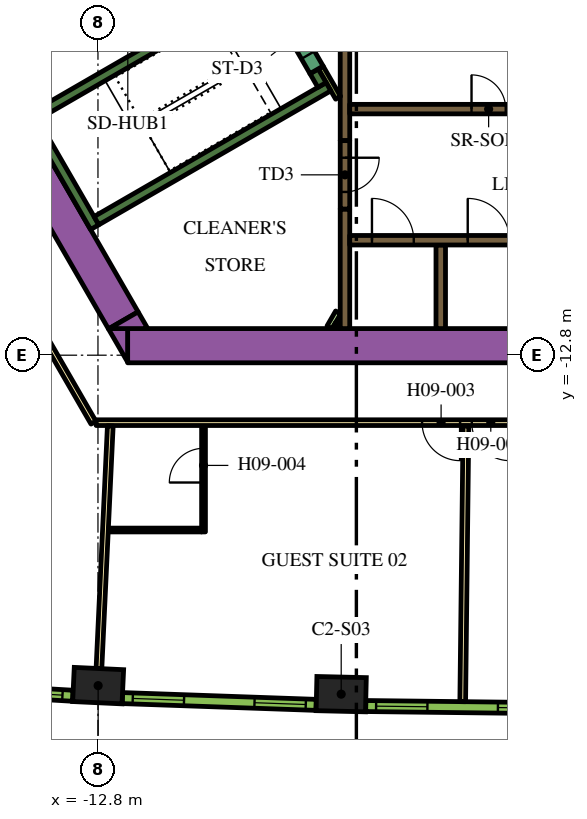
"""IFC4 building model, lengths in metres.
Left out: names, types, materials, properties, quantities, classifications, styles, units other than length and angle.
Written with IfcOpenShell. Run it as: python <this file> out.ifc"""

import sys

from ifc_helpers import new_model, si_unit, direction, frame, frame_2d, origin, origin_2d, place, context, subcontext, project, spatial, polyline, rectangle, outline, extrude, element, fill, save


model = new_model("IFC4")
c1 = context("Model", 3, precision=1e-05, world=origin(), true_north=direction((0.0, 1.0)))
c2 = subcontext(c1, "Body", "Model", "MODEL_VIEW")
j1 = project(units=[si_unit("LENGTHUNIT", "METRE"), si_unit("PLANEANGLEUNIT", "RADIAN")], contexts=[c1])
p1 = place(None, origin())
s1 = spatial("IfcSite", under=j1, at=p1, CompositionType="ELEMENT")
p2 = place(p1, origin())
s2 = spatial("IfcBuilding", under=s1, at=p2, CompositionType="ELEMENT")
p3 = place(p2, frame((0.0, 0.0, 126.6)))
s3 = spatial("IfcBuildingStorey", under=s2, at=p3, CompositionType="ELEMENT", Elevation=126.6)
for number, where, z_axis, x_axis in (
    (1, (-12.795, -21.494, 0.0), (0.0, 0.0, 1.0), (0.999, -0.047, 0.0)),
    (2, (-6.399, -21.719, 0.0), (0.0, 0.0, 1.0), (1.0, -0.023, 0.0)),
):
    element("IfcColumn", number, at=place(p3, frame(where, z_axis=z_axis, x_axis=x_axis)), inside=s3, PredefinedType="COLUMN", context=c2, shape_type="SweptSolid", body=[
        extrude(rectangle(XDim=1.3, YDim=0.9, at=origin_2d()), origin(), (0.0, 0.0, 1.0), 3.9),
    ])
p4 = place(p3, frame((-12.019, -12.55, 0.0), z_axis=(0.0, 0.0, 1.0), x_axis=(1.0, 0.0, 0.0)))
e3 = element("IfcWall", 3, at=p4, inside=s3, PredefinedType="SOLIDWALL", context=c2, shape_type="SweptSolid", body=[
    extrude(rectangle(XDim=21.63, YDim=0.9, at=frame_2d((10.815, 0.0))), origin(), (0.0, 0.0, 1.0), 3.9),
])
p5 = place(p3, origin())
e4 = element("IfcWall", 4, at=p5, inside=s3, PredefinedType="SOLIDWALL", context=c2, shape_type="SweptSolid", body=[
    extrude(outline(polyline([(-12.529, -12.1), (-12.021, -12.1), (-12.021, -12.98), (-12.529, -12.1)])), origin(), (0.0, 0.0, 1.0), 3.9),
])
p6 = place(p3, frame((-12.134, -11.883, 0.0), z_axis=(0.0, 0.0, 1.0), x_axis=(-0.500005339912, 0.866022320763, 0.0)))
e5 = element("IfcWall", 5, at=p6, inside=s3, PredefinedType="SOLIDWALL", context=c2, shape_type="SweptSolid", body=[
    extrude(rectangle(XDim=9.488, YDim=0.9, at=frame_2d((4.744, 0.0))), origin(), (0.0, 0.0, 1.0), 3.9),
])
e6 = element("IfcWall", 6, at=p5, inside=s3, PredefinedType="SOLIDWALL", context=c2, shape_type="SweptSolid", body=[
    extrude(outline(polyline([(-11.489, -12.1), (-12.505, -12.1), (-11.743, -11.66), (-11.489, -12.1)])), origin(), (0.0, 0.0, 1.0), 3.9),
])
p7 = place(p3, frame((-12.885, -9.431, 0.0), z_axis=(0.0, 0.0, 1.0), x_axis=(-0.500020560727, 0.866013532718, 0.0)))
e7 = element("IfcWall", 7, at=p7, inside=s3, PredefinedType="SOLIDWALL", context=c2, shape_type="SweptSolid", body=[
    extrude(rectangle(XDim=3.45, YDim=0.25, at=frame_2d((1.725, 0.0))), origin(), (0.0, 0.0, 1.0), 3.9),
])
p8 = place(p3, frame((-14.44, -6.49, 0.0), z_axis=(0.0, 0.0, 1.0), x_axis=(0.866022966069, 0.500004222222, 0.0)))
e8 = element("IfcWall", 8, at=p8, inside=s3, PredefinedType="SOLIDWALL", context=c2, shape_type="SweptSolid", body=[
    extrude(rectangle(XDim=6.8, YDim=0.25, at=frame_2d((3.4, 0.0))), origin(), (0.0, 0.0, 1.0), 3.9),
])
p9 = place(p3, frame((-12.84, -9.261, 0.0), z_axis=(0.0, 0.0, 1.0), x_axis=(0.866016039709, 0.500016218704, 0.0)))
e9 = element("IfcWall", 9, at=p9, inside=s3, PredefinedType="SOLIDWALL", context=c2, shape_type="SweptSolid", body=[
    extrude(rectangle(XDim=7.05, YDim=0.25, at=frame_2d((3.525, 0.0))), origin(), (0.0, 0.0, 1.0), 3.9),
])
p10 = place(p3, frame((-6.905, -5.69, 0.0), z_axis=(0.0, 0.0, 1.0), x_axis=(-0.499993700073, 0.866029041019, 0.0)))
e10 = element("IfcWall", 10, at=p10, inside=s3, PredefinedType="SOLIDWALL", context=c2, shape_type="SweptSolid", body=[
    extrude(rectangle(XDim=0.416, YDim=0.25, at=frame_2d((0.208, 0.0))), origin(), (0.0, 0.0, 1.0), 3.9),
])
p11 = place(p3, frame((-3.78, -12.1, 0.0), z_axis=(0.0, 0.0, 1.0), x_axis=(0.0, 1.0, 0.0)))
e11 = element("IfcWall", 11, at=p11, inside=s3, PredefinedType="SOLIDWALL", context=c2, shape_type="SweptSolid", body=[
    extrude(rectangle(XDim=2.2, YDim=0.25, at=frame_2d((1.1, 0.0))), origin(), (0.0, 0.0, 1.0), 3.9),
])
p12 = place(p3, frame((-6.3, -12.1, 0.0), z_axis=(0.0, 0.0, 1.0), x_axis=(0.0, 1.0, 0.0)))
e12 = element("IfcWall", 12, at=p12, inside=s3, PredefinedType="SOLIDWALL", context=c2, shape_type="SweptSolid", body=[
    extrude(rectangle(XDim=3.146, YDim=0.25, at=frame_2d((1.573, 0.0))), origin(), (0.0, 0.0, 1.0), 3.9),
])
p13 = place(p3, frame((-6.3, -4.24, 0.0), z_axis=(0.0, 0.0, 1.0), x_axis=(0.0, -1.0, 0.0)))
e13 = element("IfcWall", 13, at=p13, inside=s3, PredefinedType="SOLIDWALL", context=c2, shape_type="SweptSolid", body=[
    extrude(rectangle(XDim=2.914, YDim=0.25, at=frame_2d((1.457, 0.0))), origin(), (0.0, 0.0, 1.0), 3.9),
])
p14 = place(p3, frame((-6.708, -12.068, 0.0), z_axis=(0.0, 0.0, 1.0), x_axis=(0.500000789788, 0.8660249478, 0.0)))
e14 = element("IfcWall", 14, at=p14, inside=s3, PredefinedType="PARTITIONING", context=c2, shape_type="SweptSolid", body=[
    extrude(rectangle(XDim=0.456, YDim=0.15, at=frame_2d((0.228, 0.0))), origin(), (0.0, 0.0, 1.0), 2.75),
])
p15 = place(p3, frame((-6.534, -12.068, 0.0), z_axis=(0.0, 0.0, 1.0), x_axis=(0.500240224089, 0.865886665912, 0.0)))
e15 = element("IfcWall", 15, at=p15, inside=s3, PredefinedType="PARTITIONING", context=c2, shape_type="SweptSolid", body=[
    extrude(rectangle(XDim=0.109, YDim=0.15, at=frame_2d((0.054, 0.0))), origin(), (0.0, 0.0, 1.0), 2.75),
])
p16 = place(p3, frame((-6.48, -6.027, 0.0), z_axis=(0.0, 0.0, 1.0), x_axis=(-0.499936960004, 0.866061796884, 0.0)))
e16 = element("IfcWall", 16, at=p16, inside=s3, PredefinedType="PARTITIONING", context=c2, shape_type="SweptSolid", body=[
    extrude(rectangle(XDim=0.919, YDim=0.15, at=frame_2d((0.46, 0.0))), origin(), (0.0, 0.0, 1.0), 3.9),
])
p17 = place(p3, frame((-6.175, -9.775, 0.0), z_axis=(0.0, 0.0, 1.0), x_axis=(1.0, 0.0, 0.0)))
e17 = element("IfcWall", 17, at=p17, inside=s3, PredefinedType="SOLIDWALL", context=c2, shape_type="SweptSolid", body=[
    extrude(rectangle(XDim=12.35, YDim=0.25, at=frame_2d((6.175, 0.0))), origin(), (0.0, 0.0, 1.0), 3.9),
])
p18 = place(p17, frame((0.585, 0.0, 0.0)))
e18 = element("IfcOpeningElement", 18, at=p18, cuts=e17, PredefinedType="OPENING", context=c2, shape_type="SweptSolid", body=[
    extrude(rectangle(XDim=1.1, YDim=2.1, at=frame_2d((0.55, 1.05))), frame((0.0, 0.135, 0.0), z_axis=(0.0, -1.0, 0.0), x_axis=(1.0, 0.0, 0.0)), (0.0, 0.0, 1.0), 0.27),
])
p19 = place(p17, frame((3.105, 0.0, 0.0)))
e19 = element("IfcOpeningElement", 19, at=p19, cuts=e17, PredefinedType="OPENING", context=c2, shape_type="SweptSolid", body=[
    extrude(rectangle(XDim=1.1, YDim=2.1, at=frame_2d((0.55, 1.05))), frame((0.0, 0.135, 0.0), z_axis=(0.0, -1.0, 0.0), x_axis=(1.0, 0.0, 0.0)), (0.0, 0.0, 1.0), 0.27),
])
p20 = place(p17, frame((5.625, 0.0, 0.0)))
e20 = element("IfcOpeningElement", 20, at=p20, cuts=e17, PredefinedType="OPENING", context=c2, shape_type="SweptSolid", body=[
    extrude(rectangle(XDim=1.1, YDim=2.1, at=frame_2d((0.55, 1.05))), frame((0.0, 0.135, 0.0), z_axis=(0.0, -1.0, 0.0), x_axis=(1.0, 0.0, 0.0)), (0.0, 0.0, 1.0), 0.27),
])
p21 = place(p17, frame((8.145, 0.0, 0.0)))
e21 = element("IfcOpeningElement", 21, at=p21, cuts=e17, PredefinedType="OPENING", context=c2, shape_type="SweptSolid", body=[
    extrude(rectangle(XDim=1.1, YDim=2.1, at=frame_2d((0.55, 1.05))), frame((0.0, 0.135, 0.0), z_axis=(0.0, -1.0, 0.0), x_axis=(1.0, 0.0, 0.0)), (0.0, 0.0, 1.0), 0.27),
])
p22 = place(p17, frame((10.665, 0.0, 0.0)))
e22 = element("IfcOpeningElement", 22, at=p22, cuts=e17, PredefinedType="OPENING", context=c2, shape_type="SweptSolid", body=[
    extrude(rectangle(XDim=1.1, YDim=2.1, at=frame_2d((0.55, 1.05))), frame((0.0, 0.135, 0.0), z_axis=(0.0, -1.0, 0.0), x_axis=(1.0, 0.0, 0.0)), (0.0, 0.0, 1.0), 0.27),
])
p23 = place(p3, frame((-6.175, -6.325, 0.0), z_axis=(0.0, 0.0, 1.0), x_axis=(1.0, 0.0, 0.0)))
e23 = element("IfcWall", 23, at=p23, inside=s3, PredefinedType="SOLIDWALL", context=c2, shape_type="SweptSolid", body=[
    extrude(rectangle(XDim=12.35, YDim=0.25, at=frame_2d((6.175, 0.0))), origin(), (0.0, 0.0, 1.0), 3.9),
])
p24 = place(p23, frame((3.205, 0.0, 0.0)))
e24 = element("IfcOpeningElement", 24, at=p24, cuts=e23, PredefinedType="OPENING", context=c2, shape_type="SweptSolid", body=[
    extrude(rectangle(XDim=0.9, YDim=2.1, at=frame_2d((0.45, 1.05))), frame((0.0, 0.135, 0.0), z_axis=(0.0, -1.0, 0.0), x_axis=(1.0, 0.0, 0.0)), (0.0, 0.0, 1.0), 0.27),
])
p25 = place(p23, frame((8.145, 0.0, 0.0)))
e25 = element("IfcOpeningElement", 25, at=p25, cuts=e23, PredefinedType="OPENING", context=c2, shape_type="SweptSolid", body=[
    extrude(rectangle(XDim=1.1, YDim=2.1, at=frame_2d((0.55, 1.05))), frame((0.0, 0.135, 0.0), z_axis=(0.0, -1.0, 0.0), x_axis=(1.0, 0.0, 0.0)), (0.0, 0.0, 1.0), 0.27),
])
p26 = place(p23, frame((10.665, 0.0, 0.0)))
e26 = element("IfcOpeningElement", 26, at=p26, cuts=e23, PredefinedType="OPENING", context=c2, shape_type="SweptSolid", body=[
    extrude(rectangle(XDim=1.1, YDim=2.1, at=frame_2d((0.55, 1.05))), frame((0.0, 0.135, 0.0), z_axis=(0.0, -1.0, 0.0), x_axis=(1.0, 0.0, 0.0)), (0.0, 0.0, 1.0), 0.27),
])
p27 = place(p3, frame((-8.098, -3.474, 0.0), z_axis=(0.0, 0.0, 1.0), x_axis=(0.49994051562, -0.866059744384, 0.0)))
e27 = element("IfcWall", 27, at=p27, inside=s3, PredefinedType="SOLIDWALL", context=c2, shape_type="SweptSolid", body=[
    extrude(rectangle(XDim=2.1, YDim=0.4, at=frame_2d((1.05, 0.0))), origin(), (0.0, 0.0, 1.0), 3.9),
])
p28 = place(p27, frame((0.45, 0.0, 0.0)))
e28 = element("IfcOpeningElement", 28, at=p28, cuts=e27, PredefinedType="OPENING", context=c2, shape_type="SweptSolid", body=[
    extrude(rectangle(XDim=1.2, YDim=2.1, at=frame_2d((0.6, 1.05))), frame((0.0, 0.21, 0.0), z_axis=(0.0, -1.0, 0.0), x_axis=(1.0, 0.0, 0.0)), (0.0, 0.0, 1.0), 0.42),
])
p29 = place(p3, frame((-6.3, -7.154, 0.0), z_axis=(0.0, 0.0, 1.0), x_axis=(0.0, -1.0, 0.0)))
e29 = element("IfcWall", 29, at=p29, inside=s3, PredefinedType="SOLIDWALL", context=c2, shape_type="SweptSolid", body=[
    extrude(rectangle(XDim=1.8, YDim=0.25, at=frame_2d((0.9, 0.0))), origin(), (0.0, 0.0, 1.0), 3.9),
])
p30 = place(p29, frame((0.45, 0.0, 0.0)))
e30 = element("IfcOpeningElement", 30, at=p30, cuts=e29, PredefinedType="OPENING", context=c2, shape_type="SweptSolid", body=[
    extrude(rectangle(XDim=0.9, YDim=2.1, at=frame_2d((0.45, 1.05))), frame((0.0, 0.135, 0.0), z_axis=(0.0, -1.0, 0.0), x_axis=(1.0, 0.0, 0.0)), (0.0, 0.0, 1.0), 0.27),
])
p31 = place(p3, frame((-12.918, -14.575, 0.0), z_axis=(0.0, 0.0, 1.0), x_axis=(-0.500009150678, 0.866020120573, 0.0)))
e31 = element("IfcWall", 31, at=p31, inside=s3, PredefinedType="PARTITIONING", context=c2, shape_type="SweptSolid", body=[
    extrude(rectangle(XDim=5.258, YDim=0.15, at=frame_2d((2.629, 0.0))), origin(), (0.0, 0.0, 1.0), 2.75),
])
p32 = place(p3, frame((12.918, -14.575, 0.0), z_axis=(0.0, 0.0, 1.0), x_axis=(-1.0, 0.0, 0.0)))
e32 = element("IfcWall", 32, at=p32, inside=s3, PredefinedType="PARTITIONING", context=c2, shape_type="SweptSolid", body=[
    extrude(rectangle(XDim=25.766, YDim=0.15, at=frame_2d((12.883, 0.0))), origin(), (0.0, 0.0, 1.0), 2.75),
])
p33 = place(p32, frame((16.189, 0.0, 0.0)))
e33 = element("IfcOpeningElement", 33, at=p33, cuts=e32, PredefinedType="OPENING", context=c2, shape_type="SweptSolid", body=[
    extrude(rectangle(XDim=1.0, YDim=2.1, at=frame_2d((0.5, 1.05))), frame((0.0, 0.085, 0.0), z_axis=(0.0, -1.0, 0.0), x_axis=(1.0, 0.0, 0.0)), (0.0, 0.0, 1.0), 0.17),
])
p34 = place(p32, frame((14.882, 0.0, 0.0)))
e34 = element("IfcOpeningElement", 34, at=p34, cuts=e32, PredefinedType="OPENING", context=c2, shape_type="SweptSolid", body=[
    extrude(rectangle(XDim=1.0, YDim=2.1, at=frame_2d((0.5, 1.05))), frame((0.0, 0.085, 0.0), z_axis=(0.0, -1.0, 0.0), x_axis=(1.0, 0.0, 0.0)), (0.0, 0.0, 1.0), 0.17),
])
p35 = place(p32, frame((0.596, 0.0, 0.0)))
e35 = element("IfcOpeningElement", 35, at=p35, cuts=e32, PredefinedType="OPENING", context=c2, shape_type="SweptSolid", body=[
    extrude(rectangle(XDim=1.1, YDim=2.1, at=frame_2d((0.55, 1.05))), frame((0.0, 0.085, 0.0), z_axis=(0.0, -1.0, 0.0), x_axis=(1.0, 0.0, 0.0)), (0.0, 0.0, 1.0), 0.17),
])
p36 = place(p3, frame((-12.774, -21.045, 0.0), z_axis=(0.0, 0.0, 1.0), x_axis=(0.046750341626, 0.998906605023, 0.0)))
e36 = element("IfcWall", 36, at=p36, inside=s3, PredefinedType="PARTITIONING", context=c2, shape_type="SweptSolid", body=[
    extrude(rectangle(XDim=6.392, YDim=0.15, at=frame_2d((3.196, 0.0))), origin(), (0.0, 0.0, 1.0), 2.75),
])
p37 = place(p3, frame((-3.202, -21.916, 0.0), z_axis=(0.0, 0.0, 1.0), x_axis=(0.011707696285, 0.999931462575, 0.0)))
e37 = element("IfcWall", 37, at=p37, inside=s3, PredefinedType="PARTITIONING", context=c2, shape_type="SweptSolid", body=[
    extrude(rectangle(XDim=7.257, YDim=0.15, at=frame_2d((3.628, 0.0))), origin(), (0.0, 0.0, 1.0), 2.75),
])
p38 = place(p3, frame((-10.022, -17.45, 0.0), z_axis=(0.0, 0.0, 1.0), x_axis=(0.0, 1.0, 0.0)))
e38 = element("IfcWall", 38, at=p38, inside=s3, PredefinedType="PARTITIONING", context=c2, shape_type="SweptSolid", body=[
    extrude(rectangle(XDim=2.8, YDim=0.1, at=frame_2d((1.4, 0.0))), origin(), (0.0, 0.0, 1.0), 2.75),
])
p39 = place(p38, frame((1.3, 0.0, 0.0)))
e39 = element("IfcOpeningElement", 39, at=p39, cuts=e38, PredefinedType="OPENING", context=c2, shape_type="SweptSolid", body=[
    extrude(rectangle(XDim=0.9, YDim=2.1, at=frame_2d((0.45, 1.05))), frame((0.0, 0.06, 0.0), z_axis=(0.0, -1.0, 0.0), x_axis=(1.0, 0.0, 0.0)), (0.0, 0.0, 1.0), 0.12),
])
p40 = place(p3, frame((-10.072, -17.4, 0.0), z_axis=(0.0, 0.0, 1.0), x_axis=(-1.0, 0.0, 0.0)))
e40 = element("IfcWall", 40, at=p40, inside=s3, PredefinedType="PARTITIONING", context=c2, shape_type="SweptSolid", body=[
    extrude(rectangle(XDim=2.45, YDim=0.1, at=frame_2d((1.225, 0.0))), origin(), (0.0, 0.0, 1.0), 2.75),
])
p41 = place(p3, frame((-18.553, -21.463, 0.0), z_axis=(0.0, 0.0, 1.0), x_axis=(0.998290511436, -0.058447025388, 0.0)))
e41 = element("IfcWall", 41, at=p41, inside=s3, PredefinedType="SOLIDWALL", context=c2, shape_type="SweptSolid", body=[
    extrude(rectangle(XDim=5.1, YDim=0.29, at=frame_2d((2.55, 0.0))), origin(), (0.0, 0.0, 1.0), 3.65),
])
p42 = place(p41, frame((0.273, 0.0, 0.9)))
e42 = element("IfcOpeningElement", 42, at=p42, cuts=e41, PredefinedType="OPENING", context=c2, shape_type="SweptSolid", body=[
    extrude(rectangle(XDim=1.35, YDim=2.15, at=frame_2d((0.675, 1.075))), frame((0.0, 0.155, 0.0), z_axis=(0.0, -1.0, 0.0), x_axis=(1.0, 0.0, 0.0)), (0.0, 0.0, 1.0), 0.31),
])
p43 = place(p41, frame((3.478, 0.0, 0.9)))
e43 = element("IfcOpeningElement", 43, at=p43, cuts=e41, PredefinedType="OPENING", context=c2, shape_type="SweptSolid", body=[
    extrude(rectangle(XDim=1.35, YDim=2.15, at=frame_2d((0.675, 1.075))), frame((0.0, 0.155, 0.0), z_axis=(0.0, -1.0, 0.0), x_axis=(1.0, 0.0, 0.0)), (0.0, 0.0, 1.0), 0.31),
])
p44 = place(p3, frame((-12.157, -21.822, 0.0), z_axis=(0.0, 0.0, 1.0), x_axis=(0.999385993957, -0.035037623812, 0.0)))
e44 = element("IfcWall", 44, at=p44, inside=s3, PredefinedType="SOLIDWALL", context=c2, shape_type="SweptSolid", body=[
    extrude(rectangle(XDim=5.101, YDim=0.29, at=frame_2d((2.55, 0.0))), origin(), (0.0, 0.0, 1.0), 3.65),
])
p45 = place(p44, frame((0.273, 0.0, 0.9)))
e45 = element("IfcOpeningElement", 45, at=p45, cuts=e44, PredefinedType="OPENING", context=c2, shape_type="SweptSolid", body=[
    extrude(rectangle(XDim=1.35, YDim=2.15, at=frame_2d((0.675, 1.075))), frame((0.0, 0.155, 0.0), z_axis=(0.0, -1.0, 0.0), x_axis=(1.0, 0.0, 0.0)), (0.0, 0.0, 1.0), 0.31),
])
p46 = place(p44, frame((3.478, 0.0, 0.9)))
e46 = element("IfcOpeningElement", 46, at=p46, cuts=e44, PredefinedType="OPENING", context=c2, shape_type="SweptSolid", body=[
    extrude(rectangle(XDim=1.35, YDim=2.15, at=frame_2d((0.675, 1.075))), frame((0.0, 0.155, 0.0), z_axis=(0.0, -1.0, 0.0), x_axis=(1.0, 0.0, 0.0)), (0.0, 0.0, 1.0), 0.31),
])
p47 = place(p3, frame((-5.753, -22.031, 0.0), z_axis=(0.0, 0.0, 1.0), x_axis=(0.999931786565, -0.011679992145, 0.0)))
e47 = element("IfcWall", 47, at=p47, inside=s3, PredefinedType="SOLIDWALL", context=c2, shape_type="SweptSolid", body=[
    extrude(rectangle(XDim=5.1, YDim=0.29, at=frame_2d((2.55, 0.0))), origin(), (0.0, 0.0, 1.0), 3.65),
])
p48 = place(p47, frame((0.272, 0.0, 0.9)))
e48 = element("IfcOpeningElement", 48, at=p48, cuts=e47, PredefinedType="OPENING", context=c2, shape_type="SweptSolid", body=[
    extrude(rectangle(XDim=1.35, YDim=2.15, at=frame_2d((0.675, 1.075))), frame((0.0, 0.155, 0.0), z_axis=(0.0, -1.0, 0.0), x_axis=(1.0, 0.0, 0.0)), (0.0, 0.0, 1.0), 0.31),
])
p49 = place(p47, frame((3.478, 0.0, 0.9)))
e49 = element("IfcOpeningElement", 49, at=p49, cuts=e47, PredefinedType="OPENING", context=c2, shape_type="SweptSolid", body=[
    extrude(rectangle(XDim=1.35, YDim=2.15, at=frame_2d((0.675, 1.075))), frame((0.0, 0.155, 0.0), z_axis=(0.0, -1.0, 0.0), x_axis=(1.0, 0.0, 0.0)), (0.0, 0.0, 1.0), 0.31),
])
p50 = place(p18, origin())
e50 = element("IfcDoor", 50, at=p50, inside=s3, OperationType="DOUBLE_DOOR_SLIDING", PredefinedType="DOOR", context=c2, shape_type="SweptSolid", body=[
    extrude(rectangle(XDim=1.1, YDim=2.1, at=frame_2d((0.55, 1.05))), frame((0.0, 0.025, 0.0), z_axis=(0.0, -1.0, 0.0), x_axis=(1.0, 0.0, 0.0)), (0.0, 0.0, 1.0), 0.05),
])
fill(e18, e50)
p51 = place(p19, origin())
e51 = element("IfcDoor", 51, at=p51, inside=s3, OperationType="DOUBLE_DOOR_SLIDING", PredefinedType="DOOR", context=c2, shape_type="SweptSolid", body=[
    extrude(rectangle(XDim=1.1, YDim=2.1, at=frame_2d((0.55, 1.05))), frame((0.0, 0.025, 0.0), z_axis=(0.0, -1.0, 0.0), x_axis=(1.0, 0.0, 0.0)), (0.0, 0.0, 1.0), 0.05),
])
fill(e19, e51)
p52 = place(p24, origin())
e52 = element("IfcDoor", 52, at=p52, inside=s3, OperationType="SINGLE_SWING_LEFT", PredefinedType="DOOR", context=c2, shape_type="SweptSolid", body=[
    extrude(rectangle(XDim=0.9, YDim=2.1, at=frame_2d((0.45, 1.05))), frame((0.0, 0.025, 0.0), z_axis=(0.0, -1.0, 0.0), x_axis=(1.0, 0.0, 0.0)), (0.0, 0.0, 1.0), 0.05),
])
fill(e24, e52)
p53 = place(p28, origin())
e53 = element("IfcDoor", 53, at=p53, inside=s3, OperationType="SINGLE_SWING_LEFT", PredefinedType="DOOR", context=c2, shape_type="SweptSolid", body=[
    extrude(rectangle(XDim=1.2, YDim=2.1, at=frame_2d((0.6, 1.05))), frame((0.0, 0.025, 0.0), z_axis=(0.0, -1.0, 0.0), x_axis=(1.0, 0.0, 0.0)), (0.0, 0.0, 1.0), 0.05),
])
fill(e28, e53)
p54 = place(p30, origin())
e54 = element("IfcDoor", 54, at=p54, inside=s3, OperationType="SINGLE_SWING_LEFT", PredefinedType="DOOR", context=c2, shape_type="SweptSolid", body=[
    extrude(rectangle(XDim=0.9, YDim=2.1, at=frame_2d((0.45, 1.05))), frame((0.0, 0.025, 0.0), z_axis=(0.0, -1.0, 0.0), x_axis=(1.0, 0.0, 0.0)), (0.0, 0.0, 1.0), 0.05),
])
fill(e30, e54)
p55 = place(p33, origin())
e55 = element("IfcDoor", 55, at=p55, inside=s3, OperationType="SINGLE_SWING_LEFT", PredefinedType="DOOR", context=c2, shape_type="SweptSolid", body=[
    extrude(rectangle(XDim=1.0, YDim=2.1, at=frame_2d((0.5, 1.05))), frame((0.0, 0.025, 0.0), z_axis=(0.0, -1.0, 0.0), x_axis=(1.0, 0.0, 0.0)), (0.0, 0.0, 1.0), 0.05),
])
fill(e33, e55)
p56 = place(p39, origin())
e56 = element("IfcDoor", 56, at=p56, inside=s3, OperationType="SINGLE_SWING_LEFT", PredefinedType="DOOR", context=c2, shape_type="SweptSolid", body=[
    extrude(rectangle(XDim=0.9, YDim=2.1, at=frame_2d((0.45, 1.05))), frame((0.0, 0.025, 0.0), z_axis=(0.0, -1.0, 0.0), x_axis=(1.0, 0.0, 0.0)), (0.0, 0.0, 1.0), 0.05),
])
fill(e39, e56)
p57 = place(p34, origin())
e57 = element("IfcDoor", 57, at=p57, inside=s3, OperationType="SINGLE_SWING_RIGHT", PredefinedType="DOOR", context=c2, shape_type="SweptSolid", body=[
    extrude(rectangle(XDim=1.0, YDim=2.1, at=frame_2d((0.5, 1.05))), frame((0.0, 0.025, 0.0), z_axis=(0.0, -1.0, 0.0), x_axis=(1.0, 0.0, 0.0)), (0.0, 0.0, 1.0), 0.05),
])
fill(e34, e57)
p58 = place(p43, origin())
e58 = element("IfcWindow", 58, at=p58, inside=s3, PartitioningType="DOUBLE_PANEL_VERTICAL", PredefinedType="WINDOW", context=c2, shape_type="SweptSolid", body=[
    extrude(rectangle(XDim=1.35, YDim=2.15, at=frame_2d((0.675, 1.075))), frame((0.0, 0.015, 0.0), z_axis=(0.0, -1.0, 0.0), x_axis=(1.0, 0.0, 0.0)), (0.0, 0.0, 1.0), 0.06),
])
fill(e43, e58)
p59 = place(p45, origin())
e59 = element("IfcWindow", 59, at=p59, inside=s3, PartitioningType="DOUBLE_PANEL_VERTICAL", PredefinedType="WINDOW", context=c2, shape_type="SweptSolid", body=[
    extrude(rectangle(XDim=1.35, YDim=2.15, at=frame_2d((0.675, 1.075))), frame((0.0, 0.015, 0.0), z_axis=(0.0, -1.0, 0.0), x_axis=(1.0, 0.0, 0.0)), (0.0, 0.0, 1.0), 0.06),
])
fill(e45, e59)
p60 = place(p46, origin())
e60 = element("IfcWindow", 60, at=p60, inside=s3, PartitioningType="DOUBLE_PANEL_VERTICAL", PredefinedType="WINDOW", context=c2, shape_type="SweptSolid", body=[
    extrude(rectangle(XDim=1.35, YDim=2.15, at=frame_2d((0.675, 1.075))), frame((0.0, 0.015, 0.0), z_axis=(0.0, -1.0, 0.0), x_axis=(1.0, 0.0, 0.0)), (0.0, 0.0, 1.0), 0.06),
])
fill(e46, e60)
p61 = place(p48, origin())
e61 = element("IfcWindow", 61, at=p61, inside=s3, PartitioningType="DOUBLE_PANEL_VERTICAL", PredefinedType="WINDOW", context=c2, shape_type="SweptSolid", body=[
    extrude(rectangle(XDim=1.35, YDim=2.15, at=frame_2d((0.675, 1.075))), frame((0.0, 0.015, 0.0), z_axis=(0.0, -1.0, 0.0), x_axis=(1.0, 0.0, 0.0)), (0.0, 0.0, 1.0), 0.06),
])
fill(e48, e61)
p62 = place(p49, origin())
e62 = element("IfcWindow", 62, at=p62, inside=s3, PartitioningType="DOUBLE_PANEL_VERTICAL", PredefinedType="WINDOW", context=c2, shape_type="SweptSolid", body=[
    extrude(rectangle(XDim=1.35, YDim=2.15, at=frame_2d((0.675, 1.075))), frame((0.0, 0.015, 0.0), z_axis=(0.0, -1.0, 0.0), x_axis=(1.0, 0.0, 0.0)), (0.0, 0.0, 1.0), 0.06),
])
fill(e49, e62)
save(model, sys.argv[1])
